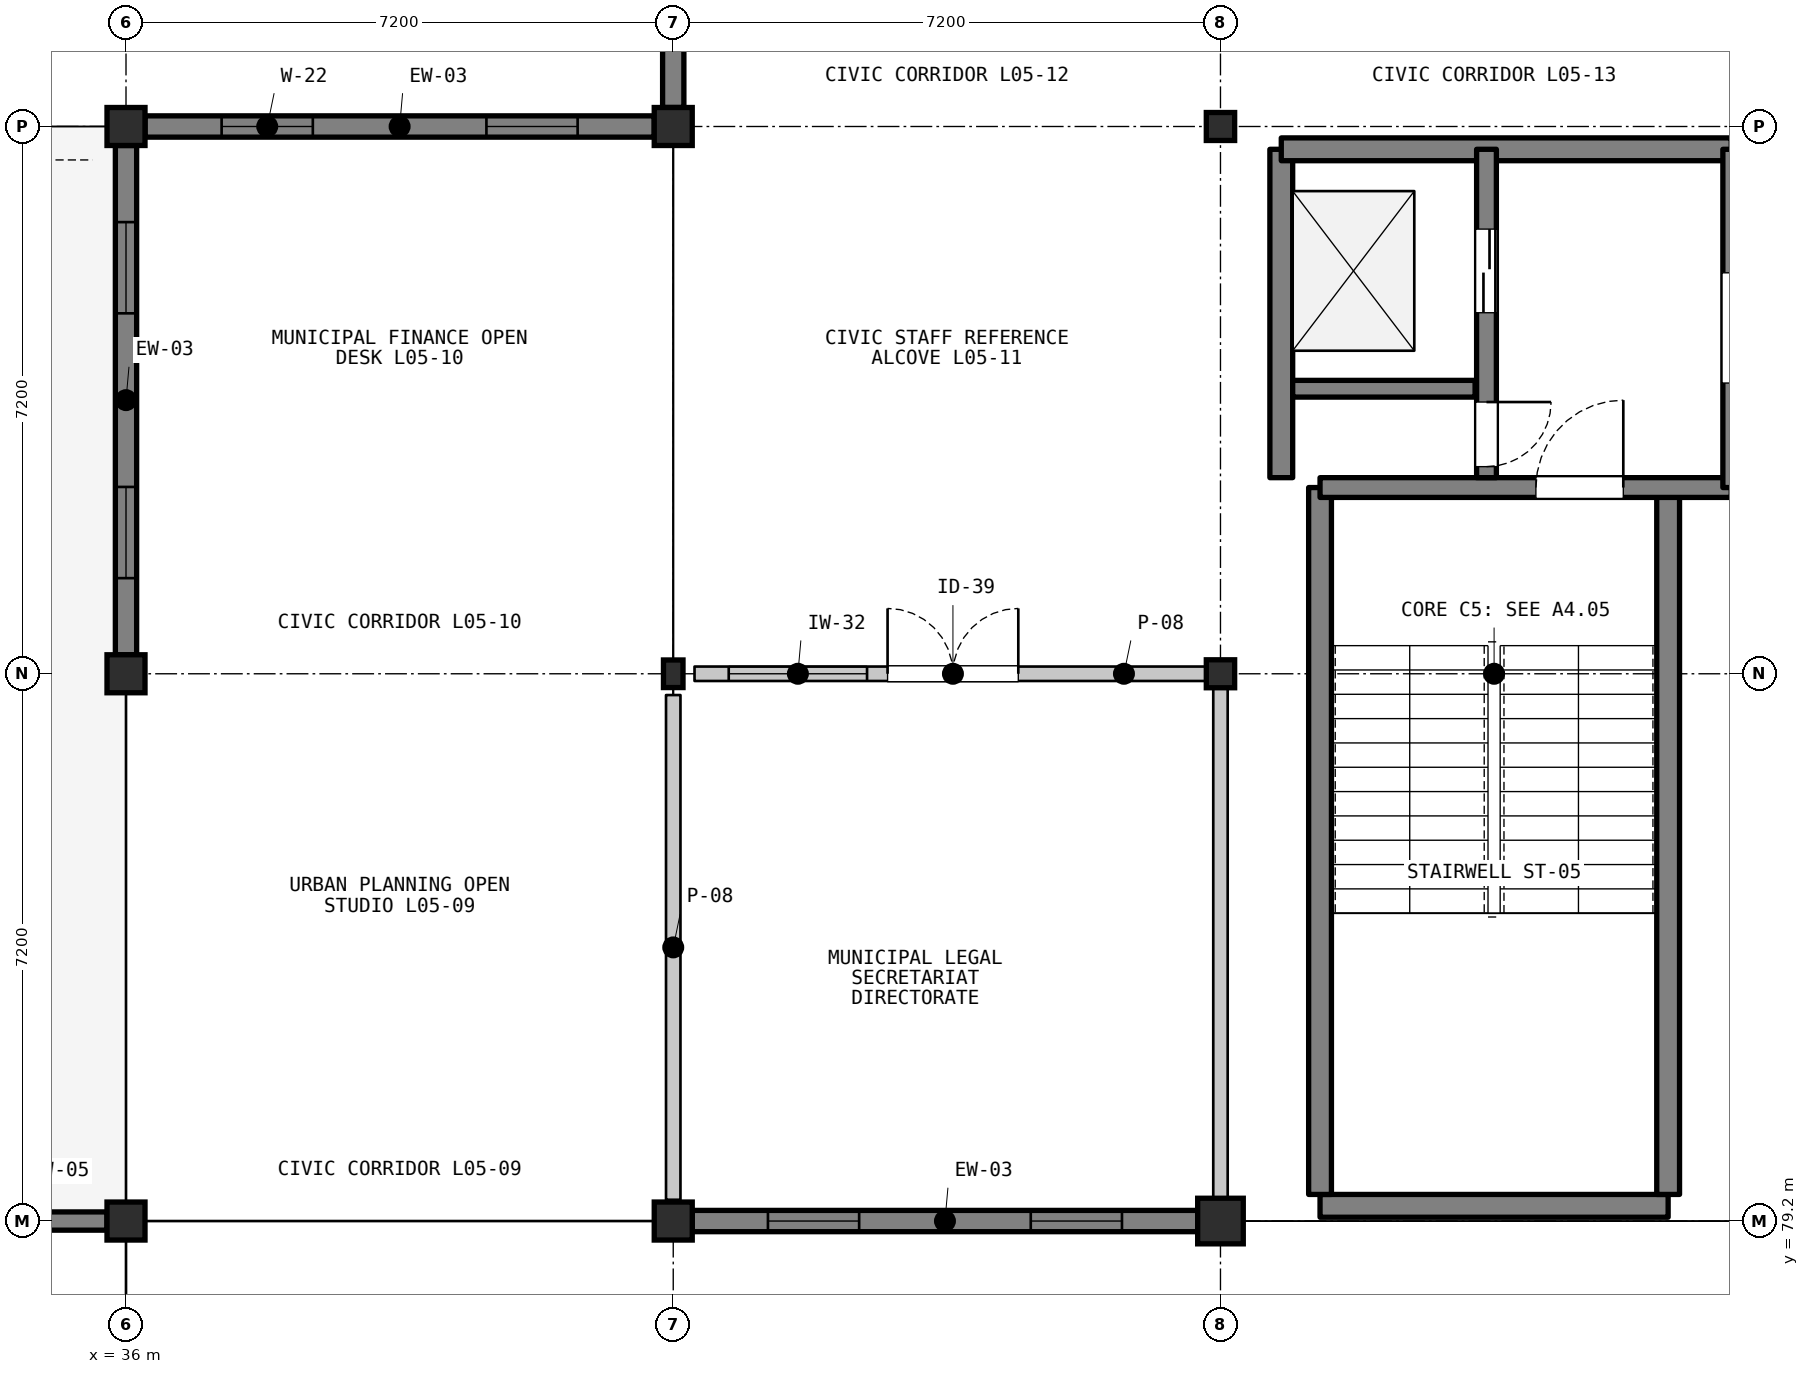
"""IFC4 building model, lengths in metres.
Left out: names, types, materials, properties, quantities, classifications, styles, units other than length and angle.
Written with IfcOpenShell. Run it as: python <this file> out.ifc"""

import sys

from ifc_helpers import new_model, si_unit, direction, frame, frame_2d, origin, origin_2d, place, context, subcontext, project, spatial, rectangle, i_section, extrude, element, fill, save


model = new_model("IFC4")
c1 = context("Model", 3, precision=1e-05, world=origin(), true_north=direction((0.0, 1.0)))
c2 = subcontext(c1, "Body", "Model", "MODEL_VIEW")
j1 = project(units=[si_unit("LENGTHUNIT", "METRE"), si_unit("PLANEANGLEUNIT", "RADIAN")], contexts=[c1])
p1 = place(None, origin())
s1 = spatial("IfcSite", under=j1, at=p1, CompositionType="ELEMENT")
p2 = place(p1, origin())
s2 = spatial("IfcBuilding", under=s1, at=p2, CompositionType="ELEMENT")
p3 = place(p2, frame((0.0, 0.0, 18.0)))
s3 = spatial("IfcBuildingStorey", under=s2, at=p3, CompositionType="ELEMENT", Elevation=18.0)
for number, where, z_axis, x_axis in (
    (1, (36.0, 79.2, 0.0), (0.0, 0.0, 1.0), (1.0, 0.0, 0.0)),
    (2, (36.0, 86.4, 0.0), (0.0, 0.0, 1.0), (1.0, 0.0, 0.0)),
    (3, (36.0, 93.6, 0.0), (0.0, 0.0, 1.0), (1.0, 0.0, 0.0)),
    (4, (43.2, 79.2, 0.0), (0.0, 0.0, 1.0), (1.0, 0.0, 0.0)),
):
    element("IfcColumn", number, at=place(p3, frame(where, z_axis=z_axis, x_axis=x_axis)), inside=s3, PredefinedType="COLUMN", context=c2, shape_type="SweptSolid", body=[
        extrude(rectangle(XDim=0.5, YDim=0.5, at=origin_2d()), origin(), (0.0, 0.0, 1.0), 3.9),
    ])
p4 = place(p3, frame((43.2, 86.4, 0.0), z_axis=(0.0, 0.0, 1.0), x_axis=(1.0, 0.0, 0.0)))
e5 = element("IfcColumn", 5, at=p4, inside=s3, PredefinedType="COLUMN", context=c2, shape_type="SweptSolid", body=[
    extrude(i_section(OverallWidth=0.257, OverallDepth=0.363, WebThickness=0.013, FlangeThickness=0.022, FilletRadius=0.015, at=origin_2d()), origin(), (0.0, 0.0, 1.0), 3.9),
])
p5 = place(p3, frame((43.2, 93.6, 0.0), z_axis=(0.0, 0.0, 1.0), x_axis=(1.0, 0.0, 0.0)))
e6 = element("IfcColumn", 6, at=p5, inside=s3, PredefinedType="COLUMN", context=c2, shape_type="SweptSolid", body=[
    extrude(rectangle(XDim=0.5, YDim=0.5, at=origin_2d()), origin(), (0.0, 0.0, 1.0), 3.9),
])
p6 = place(p3, frame((50.4, 79.2, 0.0), z_axis=(0.0, 0.0, 1.0), x_axis=(1.0, 0.0, 0.0)))
e7 = element("IfcColumn", 7, at=p6, inside=s3, PredefinedType="COLUMN", context=c2, shape_type="SweptSolid", body=[
    extrude(rectangle(XDim=0.6, YDim=0.6, at=origin_2d()), origin(), (0.0, 0.0, 1.0), 3.9),
])
for number, where, z_axis, x_axis in (
    (8, (50.4, 86.4, 0.0), (0.0, 0.0, 1.0), (1.0, 0.0, 0.0)),
    (9, (50.4, 93.6, 0.0), (0.0, 0.0, 1.0), (1.0, 0.0, 0.0)),
):
    element("IfcColumn", number, at=place(p3, frame(where, z_axis=z_axis, x_axis=x_axis)), inside=s3, PredefinedType="COLUMN", context=c2, shape_type="SweptSolid", body=[
        extrude(i_section(OverallWidth=0.373, OverallDepth=0.368, WebThickness=0.015, FlangeThickness=0.024, FilletRadius=0.015, at=origin_2d()), origin(), (0.0, 0.0, 1.0), 3.9),
    ])
p7 = place(p3, frame((29.05, 79.2, 0.0), z_axis=(0.0, 0.0, 1.0), x_axis=(1.0, 0.0, 0.0)))
e10 = element("IfcWall", 10, at=p7, inside=s3, PredefinedType="SOLIDWALL", context=c2, shape_type="SweptSolid", body=[
    extrude(rectangle(XDim=6.7, YDim=0.24, at=frame_2d((3.35, 0.0))), origin(), (0.0, 0.0, 1.0), 3.172),
])
p8 = place(p7, frame((2.6, 0.0, 0.0)))
e11 = element("IfcOpeningElement", 11, at=p8, cuts=e10, PredefinedType="OPENING", context=c2, shape_type="SweptSolid", body=[
    extrude(rectangle(XDim=1.5, YDim=2.25, at=frame_2d((0.75, 1.125))), frame((0.0, 0.13, 0.0), z_axis=(0.0, -1.0, 0.0), x_axis=(1.0, 0.0, 0.0)), (0.0, 0.0, 1.0), 0.26),
])
p9 = place(p3, frame((36.25, 93.6, 0.0), z_axis=(0.0, 0.0, 1.0), x_axis=(1.0, 0.0, 0.0)))
e12 = element("IfcWall", 12, at=p9, inside=s3, PredefinedType="SOLIDWALL", context=c2, shape_type="SweptSolid", body=[
    extrude(rectangle(XDim=6.7, YDim=0.28, at=frame_2d((3.35, 0.0))), origin(), (0.0, 0.0, 1.0), 3.172),
])
p10 = place(p9, frame((1.008, 0.0, 0.95)))
e13 = element("IfcOpeningElement", 13, at=p10, cuts=e12, PredefinedType="OPENING", context=c2, shape_type="SweptSolid", body=[
    extrude(rectangle(XDim=1.2, YDim=1.7, at=frame_2d((0.6, 0.85))), frame((0.0, 0.15, 0.0), z_axis=(0.0, -1.0, 0.0), x_axis=(1.0, 0.0, 0.0)), (0.0, 0.0, 1.0), 0.3),
])
p11 = place(p9, frame((4.492, 0.0, 0.95)))
e14 = element("IfcOpeningElement", 14, at=p11, cuts=e12, PredefinedType="OPENING", context=c2, shape_type="SweptSolid", body=[
    extrude(rectangle(XDim=1.2, YDim=1.7, at=frame_2d((0.6, 0.85))), frame((0.0, 0.15, 0.0), z_axis=(0.0, -1.0, 0.0), x_axis=(1.0, 0.0, 0.0)), (0.0, 0.0, 1.0), 0.3),
])
p12 = place(p3, frame((36.0, 86.65, 0.0), z_axis=(0.0, 0.0, 1.0), x_axis=(0.0, 1.0, 0.0)))
e15 = element("IfcWall", 15, at=p12, inside=s3, PredefinedType="SOLIDWALL", context=c2, shape_type="SweptSolid", body=[
    extrude(rectangle(XDim=6.7, YDim=0.28, at=frame_2d((3.35, 0.0))), origin(), (0.0, 0.0, 1.0), 3.172),
])
p13 = place(p12, frame((1.008, 0.0, 0.95)))
e16 = element("IfcOpeningElement", 16, at=p13, cuts=e15, PredefinedType="OPENING", context=c2, shape_type="SweptSolid", body=[
    extrude(rectangle(XDim=1.2, YDim=1.7, at=frame_2d((0.6, 0.85))), frame((0.0, 0.15, 0.0), z_axis=(0.0, -1.0, 0.0), x_axis=(1.0, 0.0, 0.0)), (0.0, 0.0, 1.0), 0.3),
])
p14 = place(p12, frame((4.492, 0.0, 0.95)))
e17 = element("IfcOpeningElement", 17, at=p14, cuts=e15, PredefinedType="OPENING", context=c2, shape_type="SweptSolid", body=[
    extrude(rectangle(XDim=1.2, YDim=1.7, at=frame_2d((0.6, 0.85))), frame((0.0, 0.15, 0.0), z_axis=(0.0, -1.0, 0.0), x_axis=(1.0, 0.0, 0.0)), (0.0, 0.0, 1.0), 0.3),
])
p15 = place(p3, frame((50.1, 79.2, 0.0), z_axis=(0.0, 0.0, 1.0), x_axis=(-1.0, 0.0, 0.0)))
e18 = element("IfcWall", 18, at=p15, inside=s3, PredefinedType="SOLIDWALL", context=c2, shape_type="SweptSolid", body=[
    extrude(rectangle(XDim=6.65, YDim=0.28, at=frame_2d((3.325, 0.0))), origin(), (0.0, 0.0, 1.0), 3.172),
])
p16 = place(p15, frame((0.996, 0.0, 0.95)))
e19 = element("IfcOpeningElement", 19, at=p16, cuts=e18, PredefinedType="OPENING", context=c2, shape_type="SweptSolid", body=[
    extrude(rectangle(XDim=1.2, YDim=1.7, at=frame_2d((0.6, 0.85))), frame((0.0, 0.15, 0.0), z_axis=(0.0, -1.0, 0.0), x_axis=(1.0, 0.0, 0.0)), (0.0, 0.0, 1.0), 0.3),
])
p17 = place(p15, frame((4.454, 0.0, 0.95)))
e20 = element("IfcOpeningElement", 20, at=p17, cuts=e18, PredefinedType="OPENING", context=c2, shape_type="SweptSolid", body=[
    extrude(rectangle(XDim=1.2, YDim=1.7, at=frame_2d((0.6, 0.85))), frame((0.0, 0.15, 0.0), z_axis=(0.0, -1.0, 0.0), x_axis=(1.0, 0.0, 0.0)), (0.0, 0.0, 1.0), 0.3),
])
p18 = place(p3, frame((43.2, 93.85, 0.0), z_axis=(0.0, 0.0, 1.0), x_axis=(0.0, 1.0, 0.0)))
e21 = element("IfcWall", 21, at=p18, inside=s3, PredefinedType="SOLIDWALL", context=c2, shape_type="SweptSolid", body=[
    extrude(rectangle(XDim=6.7, YDim=0.28, at=frame_2d((3.35, 0.0))), origin(), (0.0, 0.0, 1.0), 3.172),
])
p19 = place(p18, frame((0.983, 0.0, 0.95)))
e22 = element("IfcOpeningElement", 22, at=p19, cuts=e21, PredefinedType="OPENING", context=c2, shape_type="SweptSolid", body=[
    extrude(rectangle(XDim=1.25, YDim=1.85, at=frame_2d((0.625, 0.925))), frame((0.0, 0.15, 0.0), z_axis=(0.0, -1.0, 0.0), x_axis=(1.0, 0.0, 0.0)), (0.0, 0.0, 1.0), 0.3),
])
p20 = place(p18, frame((4.467, 0.0, 0.95)))
e23 = element("IfcOpeningElement", 23, at=p20, cuts=e21, PredefinedType="OPENING", context=c2, shape_type="SweptSolid", body=[
    extrude(rectangle(XDim=1.25, YDim=1.85, at=frame_2d((0.625, 0.925))), frame((0.0, 0.15, 0.0), z_axis=(0.0, -1.0, 0.0), x_axis=(1.0, 0.0, 0.0)), (0.0, 0.0, 1.0), 0.3),
])
p21 = place(p3, frame((51.71, 79.4, 0.0), z_axis=(0.0, 0.0, 1.0), x_axis=(1.0, 0.0, 0.0)))
e24 = element("IfcWall", 24, at=p21, inside=s3, PredefinedType="SHEAR", context=c2, shape_type="SweptSolid", body=[
    extrude(rectangle(XDim=4.58, YDim=0.3, at=frame_2d((2.29, 0.0))), origin(), (0.0, 0.0, 1.0), 3.72),
])
for number, where, z_axis, x_axis in (
    (25, (51.71, 79.55, 0.0), (0.0, 0.0, 1.0), (0.0, 1.0, 0.0)),
    (26, (56.29, 79.55, 0.0), (0.0, 0.0, 1.0), (0.0, 1.0, 0.0)),
):
    element("IfcWall", number, at=place(p3, frame(where, z_axis=z_axis, x_axis=x_axis)), inside=s3, PredefinedType="SHEAR", context=c2, shape_type="SweptSolid", body=[
        extrude(rectangle(XDim=9.3, YDim=0.3, at=frame_2d((4.65, 0.0))), origin(), (0.0, 0.0, 1.0), 3.72),
    ])
p22 = place(p3, frame((51.71, 88.85, 0.0), z_axis=(0.0, 0.0, 1.0), x_axis=(1.0, 0.0, 0.0)))
e27 = element("IfcWall", 27, at=p22, inside=s3, PredefinedType="SHEAR", context=c2, shape_type="SweptSolid", body=[
    extrude(rectangle(XDim=5.41, YDim=0.26, at=frame_2d((2.705, 0.0))), origin(), (0.0, 0.0, 1.0), 3.72),
])
p23 = place(p22, frame((2.84, 0.0, 0.0)))
e28 = element("IfcOpeningElement", 28, at=p23, cuts=e27, PredefinedType="OPENING", context=c2, shape_type="SweptSolid", body=[
    extrude(rectangle(XDim=1.15, YDim=2.15, at=frame_2d((0.575, 1.075))), frame((0.0, 0.14, 0.0), z_axis=(0.0, -1.0, 0.0), x_axis=(1.0, 0.0, 0.0)), (0.0, 0.0, 1.0), 0.28),
])
p24 = place(p3, frame((51.2, 88.98, 0.0), z_axis=(0.0, 0.0, 1.0), x_axis=(0.0, 1.0, 0.0)))
e29 = element("IfcWall", 29, at=p24, inside=s3, PredefinedType="SHEAR", context=c2, shape_type="SweptSolid", body=[
    extrude(rectangle(XDim=4.32, YDim=0.3, at=frame_2d((2.16, 0.0))), origin(), (0.0, 0.0, 1.0), 3.72),
])
p25 = place(p3, frame((51.2, 93.3, 0.0), z_axis=(0.0, 0.0, 1.0), x_axis=(1.0, 0.0, 0.0)))
e30 = element("IfcWall", 30, at=p25, inside=s3, PredefinedType="SHEAR", context=c2, shape_type="SweptSolid", body=[
    extrude(rectangle(XDim=5.92, YDim=0.3, at=frame_2d((2.96, 0.0))), origin(), (0.0, 0.0, 1.0), 3.72),
])
p26 = place(p3, frame((51.35, 90.15, 0.0), z_axis=(0.0, 0.0, 1.0), x_axis=(1.0, 0.0, 0.0)))
e31 = element("IfcWall", 31, at=p26, inside=s3, PredefinedType="SHEAR", context=c2, shape_type="SweptSolid", body=[
    extrude(rectangle(XDim=2.4, YDim=0.22, at=frame_2d((1.2, 0.0))), origin(), (0.0, 0.0, 1.0), 3.72),
])
p27 = place(p3, frame((53.9, 93.3, 0.0), z_axis=(0.0, 0.0, 1.0), x_axis=(0.0, -1.0, 0.0)))
e32 = element("IfcWall", 32, at=p27, inside=s3, PredefinedType="SHEAR", context=c2, shape_type="SweptSolid", body=[
    extrude(rectangle(XDim=4.32, YDim=0.26, at=frame_2d((2.16, 0.0))), origin(), (0.0, 0.0, 1.0), 3.72),
])
p28 = place(p27, frame((1.05, 0.0, 0.0)))
e33 = element("IfcOpeningElement", 33, at=p28, cuts=e32, PredefinedType="OPENING", context=c2, shape_type="SweptSolid", body=[
    extrude(rectangle(XDim=1.1, YDim=2.15, at=frame_2d((0.55, 1.075))), frame((0.0, 0.14, 0.0), z_axis=(0.0, -1.0, 0.0), x_axis=(1.0, 0.0, 0.0)), (0.0, 0.0, 1.0), 0.28),
])
p29 = place(p27, frame((3.325, 0.0, 0.0)))
e34 = element("IfcOpeningElement", 34, at=p29, cuts=e32, PredefinedType="OPENING", context=c2, shape_type="SweptSolid", body=[
    extrude(rectangle(XDim=0.85, YDim=2.05, at=frame_2d((0.425, 1.025))), frame((0.0, 0.14, 0.0), z_axis=(0.0, -1.0, 0.0), x_axis=(1.0, 0.0, 0.0)), (0.0, 0.0, 1.0), 0.28),
])
p30 = place(p3, frame((57.12, 93.3, 0.0), z_axis=(0.0, 0.0, 1.0), x_axis=(0.0, -1.0, 0.0)))
e35 = element("IfcWall", 35, at=p30, inside=s3, PredefinedType="SHEAR", context=c2, shape_type="SweptSolid", body=[
    extrude(rectangle(XDim=4.45, YDim=0.22, at=frame_2d((2.225, 0.0))), origin(), (0.0, 0.0, 1.0), 3.72),
])
p31 = place(p30, frame((1.625, 0.0, 0.0)))
e36 = element("IfcOpeningElement", 36, at=p31, cuts=e35, PredefinedType="OPENING", context=c2, shape_type="SweptSolid", body=[
    extrude(rectangle(XDim=1.45, YDim=2.2, at=frame_2d((0.725, 1.1))), frame((0.0, 0.12, 0.0), z_axis=(0.0, -1.0, 0.0), x_axis=(1.0, 0.0, 0.0)), (0.0, 0.0, 1.0), 0.24),
])
p32 = place(p3, frame((43.48, 86.4, 0.0), z_axis=(0.0, 0.0, 1.0), x_axis=(1.0, 0.0, 0.0)))
e37 = element("IfcWall", 37, at=p32, inside=s3, PredefinedType="PARTITIONING", context=c2, shape_type="SweptSolid", body=[
    extrude(rectangle(XDim=6.8, YDim=0.19, at=frame_2d((3.4, 0.0))), origin(), (0.0, 0.0, 1.0), 3.088),
])
p33 = place(p32, frame((2.54, 0.0, 0.0)))
e38 = element("IfcOpeningElement", 38, at=p33, cuts=e37, PredefinedType="OPENING", context=c2, shape_type="SweptSolid", body=[
    extrude(rectangle(XDim=1.72, YDim=2.32, at=frame_2d((0.86, 1.16))), frame((0.0, 0.105, 0.0), z_axis=(0.0, -1.0, 0.0), x_axis=(1.0, 0.0, 0.0)), (0.0, 0.0, 1.0), 0.21),
])
p34 = place(p32, frame((0.45, 0.0, 1.05)))
e39 = element("IfcOpeningElement", 39, at=p34, cuts=e37, PredefinedType="OPENING", context=c2, shape_type="SweptSolid", body=[
    extrude(rectangle(XDim=1.82, YDim=1.02, at=frame_2d((0.91, 0.51))), frame((0.0, 0.105, 0.0), z_axis=(0.0, -1.0, 0.0), x_axis=(1.0, 0.0, 0.0)), (0.0, 0.0, 1.0), 0.21),
])
p35 = place(p3, frame((43.2, 79.48, 0.0), z_axis=(0.0, 0.0, 1.0), x_axis=(0.0, 1.0, 0.0)))
e40 = element("IfcWall", 40, at=p35, inside=s3, PredefinedType="PARTITIONING", context=c2, shape_type="SweptSolid", body=[
    extrude(rectangle(XDim=6.64, YDim=0.19, at=frame_2d((3.32, 0.0))), origin(), (0.0, 0.0, 1.0), 3.157),
])
p36 = place(p3, frame((50.4, 86.28, 0.0), z_axis=(0.0, 0.0, 1.0), x_axis=(0.0, -1.0, 0.0)))
e41 = element("IfcWall", 41, at=p36, inside=s3, PredefinedType="PARTITIONING", context=c2, shape_type="SweptSolid", body=[
    extrude(rectangle(XDim=6.96, YDim=0.19, at=frame_2d((3.48, 0.0))), origin(), (0.0, 0.0, 1.0), 3.088),
])
p37 = place(p10, origin())
e42 = element("IfcWindow", 42, at=p37, inside=s3, PartitioningType="SINGLE_PANEL", PredefinedType="WINDOW", context=c2, shape_type="SweptSolid", body=[
    extrude(rectangle(XDim=1.2, YDim=1.7, at=frame_2d((0.6, 0.85))), frame((0.0, 0.03, 0.0), z_axis=(0.0, -1.0, 0.0), x_axis=(1.0, 0.0, 0.0)), (0.0, 0.0, 1.0), 0.06),
])
fill(e13, e42)
p38 = place(p11, origin())
e43 = element("IfcWindow", 43, at=p38, inside=s3, PartitioningType="SINGLE_PANEL", PredefinedType="WINDOW", context=c2, shape_type="SweptSolid", body=[
    extrude(rectangle(XDim=1.2, YDim=1.7, at=frame_2d((0.6, 0.85))), frame((0.0, 0.03, 0.0), z_axis=(0.0, -1.0, 0.0), x_axis=(1.0, 0.0, 0.0)), (0.0, 0.0, 1.0), 0.06),
])
fill(e14, e43)
p39 = place(p13, origin())
e44 = element("IfcWindow", 44, at=p39, inside=s3, PartitioningType="SINGLE_PANEL", PredefinedType="WINDOW", context=c2, shape_type="SweptSolid", body=[
    extrude(rectangle(XDim=1.2, YDim=1.7, at=frame_2d((0.6, 0.85))), frame((0.0, 0.03, 0.0), z_axis=(0.0, -1.0, 0.0), x_axis=(1.0, 0.0, 0.0)), (0.0, 0.0, 1.0), 0.06),
])
fill(e16, e44)
p40 = place(p14, origin())
e45 = element("IfcWindow", 45, at=p40, inside=s3, PartitioningType="SINGLE_PANEL", PredefinedType="WINDOW", context=c2, shape_type="SweptSolid", body=[
    extrude(rectangle(XDim=1.2, YDim=1.7, at=frame_2d((0.6, 0.85))), frame((0.0, 0.03, 0.0), z_axis=(0.0, -1.0, 0.0), x_axis=(1.0, 0.0, 0.0)), (0.0, 0.0, 1.0), 0.06),
])
fill(e17, e45)
p41 = place(p16, origin())
e46 = element("IfcWindow", 46, at=p41, inside=s3, PartitioningType="SINGLE_PANEL", PredefinedType="WINDOW", context=c2, shape_type="SweptSolid", body=[
    extrude(rectangle(XDim=1.2, YDim=1.7, at=frame_2d((0.6, 0.85))), frame((0.0, 0.03, 0.0), z_axis=(0.0, -1.0, 0.0), x_axis=(1.0, 0.0, 0.0)), (0.0, 0.0, 1.0), 0.06),
])
fill(e19, e46)
p42 = place(p17, origin())
e47 = element("IfcWindow", 47, at=p42, inside=s3, PartitioningType="SINGLE_PANEL", PredefinedType="WINDOW", context=c2, shape_type="SweptSolid", body=[
    extrude(rectangle(XDim=1.2, YDim=1.7, at=frame_2d((0.6, 0.85))), frame((0.0, 0.03, 0.0), z_axis=(0.0, -1.0, 0.0), x_axis=(1.0, 0.0, 0.0)), (0.0, 0.0, 1.0), 0.06),
])
fill(e20, e47)
p43 = place(p23, origin())
e48 = element("IfcDoor", 48, at=p43, inside=s3, OperationType="SINGLE_SWING_RIGHT", PredefinedType="DOOR", context=c2, shape_type="SweptSolid", body=[
    extrude(rectangle(XDim=1.15, YDim=2.15, at=frame_2d((0.575, 1.075))), frame((0.0, 0.025, 0.0), z_axis=(0.0, -1.0, 0.0), x_axis=(1.0, 0.0, 0.0)), (0.0, 0.0, 1.0), 0.05),
])
fill(e28, e48)
p44 = place(p28, origin())
e49 = element("IfcDoor", 49, at=p44, inside=s3, OperationType="DOUBLE_DOOR_SLIDING", PredefinedType="DOOR", context=c2, shape_type="SweptSolid", body=[
    extrude(rectangle(XDim=1.1, YDim=2.15, at=frame_2d((0.55, 1.075))), frame((0.0, 0.025, 0.0), z_axis=(0.0, -1.0, 0.0), x_axis=(1.0, 0.0, 0.0)), (0.0, 0.0, 1.0), 0.05),
])
fill(e33, e49)
p45 = place(p29, origin())
e50 = element("IfcDoor", 50, at=p45, inside=s3, OperationType="SINGLE_SWING_LEFT", PredefinedType="DOOR", context=c2, shape_type="SweptSolid", body=[
    extrude(rectangle(XDim=0.85, YDim=2.05, at=frame_2d((0.425, 1.025))), frame((0.0, 0.025, 0.0), z_axis=(0.0, -1.0, 0.0), x_axis=(1.0, 0.0, 0.0)), (0.0, 0.0, 1.0), 0.05),
])
fill(e34, e50)
p46 = place(p33, origin())
e51 = element("IfcDoor", 51, at=p46, inside=s3, OperationType="DOUBLE_DOOR_SINGLE_SWING", PredefinedType="DOOR", context=c2, shape_type="SweptSolid", body=[
    extrude(rectangle(XDim=1.72, YDim=2.32, at=frame_2d((0.86, 1.16))), frame((0.0, 0.025, 0.0), z_axis=(0.0, -1.0, 0.0), x_axis=(1.0, 0.0, 0.0)), (0.0, 0.0, 1.0), 0.05),
])
fill(e38, e51)
p47 = place(p34, origin())
e52 = element("IfcWindow", 52, at=p47, inside=s3, PartitioningType="SINGLE_PANEL", PredefinedType="WINDOW", context=c2, shape_type="SweptSolid", body=[
    extrude(rectangle(XDim=1.82, YDim=1.02, at=frame_2d((0.91, 0.51))), frame((0.0, 0.03, 0.0), z_axis=(0.0, -1.0, 0.0), x_axis=(1.0, 0.0, 0.0)), (0.0, 0.0, 1.0), 0.06),
])
fill(e39, e52)
save(model, sys.argv[1])
